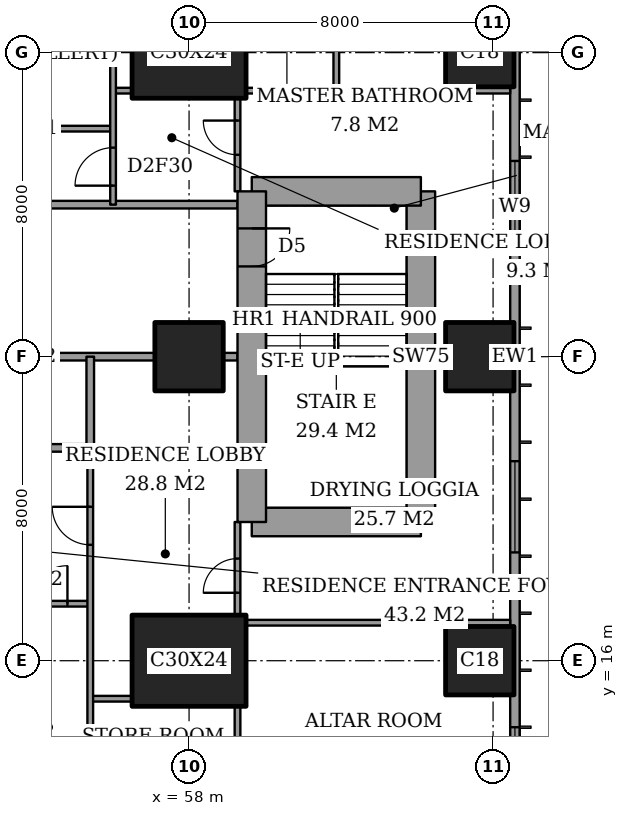
"""IFC4 building model, lengths in metres.
Left out: names, types, materials, properties, quantities, classifications, styles, units other than length and angle.
Written with IfcOpenShell. Run it as: python <this file> out.ifc"""

import sys

from ifc_helpers import new_model, si_unit, direction, frame, frame_2d, origin, origin_2d, place, context, subcontext, project, spatial, rectangle, extrude, element, fill, save


model = new_model("IFC4")
c1 = context("Model", 3, precision=1e-05, world=origin(), true_north=direction((0.0, 1.0)))
c2 = subcontext(c1, "Body", "Model", "MODEL_VIEW")
j1 = project(units=[si_unit("LENGTHUNIT", "METRE"), si_unit("PLANEANGLEUNIT", "RADIAN")], contexts=[c1])
p1 = place(None, origin())
s1 = spatial("IfcSite", under=j1, at=p1, CompositionType="ELEMENT")
p2 = place(p1, origin())
s2 = spatial("IfcBuilding", under=s1, at=p2, CompositionType="ELEMENT")
p3 = place(p2, frame((0.0, 0.0, 211.0)))
s3 = spatial("IfcBuildingStorey", under=s2, at=p3, CompositionType="ELEMENT", Elevation=211.0)
p4 = place(p3, frame((58.0, 16.0, 0.0), z_axis=(0.0, 0.0, 1.0), x_axis=(1.0, 0.0, 0.0)))
e1 = element("IfcColumn", 1, at=p4, inside=s3, PredefinedType="COLUMN", context=c2, shape_type="SweptSolid", body=[
    extrude(rectangle(XDim=3.0, YDim=2.4, at=origin_2d()), origin(), (0.0, 0.0, 1.0), 3.6),
])
p5 = place(p3, frame((58.0, 24.0, 0.0), z_axis=(0.0, 0.0, 1.0), x_axis=(1.0, 0.0, 0.0)))
e2 = element("IfcColumn", 2, at=p5, inside=s3, PredefinedType="COLUMN", context=c2, shape_type="SweptSolid", body=[
    extrude(rectangle(XDim=1.8, YDim=1.8, at=origin_2d()), origin(), (0.0, 0.0, 1.0), 3.6),
])
p6 = place(p3, frame((58.0, 32.0, 0.0), z_axis=(0.0, 0.0, 1.0), x_axis=(1.0, 0.0, 0.0)))
e3 = element("IfcColumn", 3, at=p6, inside=s3, PredefinedType="COLUMN", context=c2, shape_type="SweptSolid", body=[
    extrude(rectangle(XDim=3.0, YDim=2.4, at=origin_2d()), origin(), (0.0, 0.0, 1.0), 3.6),
])
for number, where, z_axis, x_axis in (
    (4, (65.65, 16.0, 0.0), (0.0, 0.0, 1.0), (1.0, 0.0, 0.0)),
    (5, (65.65, 24.0, 0.0), (0.0, 0.0, 1.0), (1.0, 0.0, 0.0)),
    (6, (65.65, 32.0, 0.0), (0.0, 0.0, 1.0), (1.0, 0.0, 0.0)),
):
    element("IfcColumn", number, at=place(p3, frame(where, z_axis=z_axis, x_axis=x_axis)), inside=s3, PredefinedType="COLUMN", context=c2, shape_type="SweptSolid", body=[
        extrude(rectangle(XDim=1.8, YDim=1.8, at=origin_2d()), origin(), (0.0, 0.0, 1.0), 3.6),
    ])
p7 = place(p3, frame((59.65, 19.65, 0.0), z_axis=(0.0, 0.0, 1.0), x_axis=(1.0, 0.0, 0.0)))
e7 = element("IfcWall", 7, at=p7, inside=s3, PredefinedType="SHEAR", context=c2, shape_type="SweptSolid", body=[
    extrude(rectangle(XDim=4.45, YDim=0.75, at=frame_2d((2.225, 0.0))), origin(), (0.0, 0.0, 1.0), 3.6),
])
p8 = place(p3, frame((64.1, 19.65, 0.0), z_axis=(0.0, 0.0, 1.0), x_axis=(0.0, 1.0, 0.0)))
e8 = element("IfcWall", 8, at=p8, inside=s3, PredefinedType="SHEAR", context=c2, shape_type="SweptSolid", body=[
    extrude(rectangle(XDim=8.7, YDim=0.75, at=frame_2d((4.35, 0.0))), origin(), (0.0, 0.0, 1.0), 3.6),
])
p9 = place(p3, frame((64.1, 28.35, 0.0), z_axis=(0.0, 0.0, 1.0), x_axis=(-1.0, 0.0, 0.0)))
e9 = element("IfcWall", 9, at=p9, inside=s3, PredefinedType="SHEAR", context=c2, shape_type="SweptSolid", body=[
    extrude(rectangle(XDim=4.45, YDim=0.75, at=frame_2d((2.225, 0.0))), origin(), (0.0, 0.0, 1.0), 3.6),
])
p10 = place(p3, frame((59.65, 28.35, 0.0), z_axis=(0.0, 0.0, 1.0), x_axis=(0.0, -1.0, 0.0)))
e10 = element("IfcWall", 10, at=p10, inside=s3, PredefinedType="SHEAR", context=c2, shape_type="SweptSolid", body=[
    extrude(rectangle(XDim=8.7, YDim=0.75, at=frame_2d((4.35, 0.0))), origin(), (0.0, 0.0, 1.0), 3.6),
])
p11 = place(p10, frame((0.975, 0.0, 0.0)))
e11 = element("IfcOpeningElement", 11, at=p11, cuts=e10, PredefinedType="OPENING", context=c2, shape_type="SweptSolid", body=[
    extrude(rectangle(XDim=1.0, YDim=2.1, at=frame_2d((0.5, 1.05))), frame((0.0, 0.385, 0.0), z_axis=(0.0, -1.0, 0.0), x_axis=(1.0, 0.0, 0.0)), (0.0, 0.0, 1.0), 0.77),
])
p12 = place(p3, frame((66.575, 3.175, 0.0), z_axis=(0.0, 0.0, 1.0), x_axis=(0.0, 1.0, 0.0)))
e12 = element("IfcWall", 12, at=p12, inside=s3, PredefinedType="SOLIDWALL", context=c2, shape_type="SweptSolid", body=[
    extrude(rectangle(XDim=41.65, YDim=0.25, at=frame_2d((20.825, 0.0))), origin(), (0.0, 0.0, 1.0), 3.6),
])
p13 = place(p12, frame((0.825, 0.0, 0.2)))
e13 = element("IfcOpeningElement", 13, at=p13, cuts=e12, PredefinedType="OPENING", context=c2, shape_type="SweptSolid", body=[
    extrude(rectangle(XDim=2.4, YDim=2.4, at=frame_2d((1.2, 1.2))), frame((0.0, 0.135, 0.0), z_axis=(0.0, -1.0, 0.0), x_axis=(1.0, 0.0, 0.0)), (0.0, 0.0, 1.0), 0.27),
])
p14 = place(p12, frame((6.225, 0.0, 0.2)))
e14 = element("IfcOpeningElement", 14, at=p14, cuts=e12, PredefinedType="OPENING", context=c2, shape_type="SweptSolid", body=[
    extrude(rectangle(XDim=1.2, YDim=2.4, at=frame_2d((0.6, 1.2))), frame((0.0, 0.135, 0.0), z_axis=(0.0, -1.0, 0.0), x_axis=(1.0, 0.0, 0.0)), (0.0, 0.0, 1.0), 0.27),
])
p15 = place(p12, frame((8.675, 0.0, 0.2)))
e15 = element("IfcOpeningElement", 15, at=p15, cuts=e12, PredefinedType="OPENING", context=c2, shape_type="SweptSolid", body=[
    extrude(rectangle(XDim=2.4, YDim=2.4, at=frame_2d((1.2, 1.2))), frame((0.0, 0.135, 0.0), z_axis=(0.0, -1.0, 0.0), x_axis=(1.0, 0.0, 0.0)), (0.0, 0.0, 1.0), 0.27),
])
p16 = place(p12, frame((15.675, 0.0, 0.2)))
e16 = element("IfcOpeningElement", 16, at=p16, cuts=e12, PredefinedType="OPENING", context=c2, shape_type="SweptSolid", body=[
    extrude(rectangle(XDim=2.4, YDim=2.4, at=frame_2d((1.2, 1.2))), frame((0.0, 0.135, 0.0), z_axis=(0.0, -1.0, 0.0), x_axis=(1.0, 0.0, 0.0)), (0.0, 0.0, 1.0), 0.27),
])
p17 = place(p12, frame((23.575, 0.0, 0.2)))
e17 = element("IfcOpeningElement", 17, at=p17, cuts=e12, PredefinedType="OPENING", context=c2, shape_type="SweptSolid", body=[
    extrude(rectangle(XDim=2.4, YDim=2.4, at=frame_2d((1.2, 1.2))), frame((0.0, 0.135, 0.0), z_axis=(0.0, -1.0, 0.0), x_axis=(1.0, 0.0, 0.0)), (0.0, 0.0, 1.0), 0.27),
])
p18 = place(p12, frame((30.775, 0.0, 0.2)))
e18 = element("IfcOpeningElement", 18, at=p18, cuts=e12, PredefinedType="OPENING", context=c2, shape_type="SweptSolid", body=[
    extrude(rectangle(XDim=2.4, YDim=2.4, at=frame_2d((1.2, 1.2))), frame((0.0, 0.135, 0.0), z_axis=(0.0, -1.0, 0.0), x_axis=(1.0, 0.0, 0.0)), (0.0, 0.0, 1.0), 0.27),
])
p19 = place(p12, frame((34.55, 0.0, 0.2)))
e19 = element("IfcOpeningElement", 19, at=p19, cuts=e12, PredefinedType="OPENING", context=c2, shape_type="SweptSolid", body=[
    extrude(rectangle(XDim=1.2, YDim=2.4, at=frame_2d((0.6, 1.2))), frame((0.0, 0.135, 0.0), z_axis=(0.0, -1.0, 0.0), x_axis=(1.0, 0.0, 0.0)), (0.0, 0.0, 1.0), 0.27),
])
p20 = place(p12, frame((38.425, 0.0, 0.2)))
e20 = element("IfcOpeningElement", 20, at=p20, cuts=e12, PredefinedType="OPENING", context=c2, shape_type="SweptSolid", body=[
    extrude(rectangle(XDim=2.4, YDim=2.4, at=frame_2d((1.2, 1.2))), frame((0.0, 0.135, 0.0), z_axis=(0.0, -1.0, 0.0), x_axis=(1.0, 0.0, 0.0)), (0.0, 0.0, 1.0), 0.27),
])
p21 = place(p3, frame((55.4, 15.0, 0.0), z_axis=(0.0, 0.0, 1.0), x_axis=(1.0, 0.0, 0.0)))
e21 = element("IfcWall", 21, at=p21, inside=s3, PredefinedType="PARTITIONING", context=c2, shape_type="SweptSolid", body=[
    extrude(rectangle(XDim=1.1, YDim=0.15, at=frame_2d((0.55, 0.0))), origin(), (0.0, 0.0, 1.0), 3.35),
])
p22 = place(p3, frame((59.5, 17.0, 0.0), z_axis=(0.0, 0.0, 1.0), x_axis=(1.0, 0.0, 0.0)))
e22 = element("IfcWall", 22, at=p22, inside=s3, PredefinedType="PARTITIONING", context=c2, shape_type="SweptSolid", body=[
    extrude(rectangle(XDim=6.95, YDim=0.15, at=frame_2d((3.475, 0.0))), origin(), (0.0, 0.0, 1.0), 3.35),
])
p23 = place(p3, frame((51.6, 17.5, 0.0), z_axis=(0.0, 0.0, 1.0), x_axis=(1.0, 0.0, 0.0)))
e23 = element("IfcWall", 23, at=p23, inside=s3, PredefinedType="PARTITIONING", context=c2, shape_type="SweptSolid", body=[
    extrude(rectangle(XDim=3.8, YDim=0.15, at=frame_2d((1.9, 0.0))), origin(), (0.0, 0.0, 1.0), 3.35),
])
p24 = place(p23, frame((2.2, 0.0, 0.0)))
e24 = element("IfcOpeningElement", 24, at=p24, cuts=e23, PredefinedType="OPENING", context=c2, shape_type="SweptSolid", body=[
    extrude(rectangle(XDim=1.0, YDim=2.1, at=frame_2d((0.5, 1.05))), frame((0.0, 0.085, 0.0), z_axis=(0.0, -1.0, 0.0), x_axis=(1.0, 0.0, 0.0)), (0.0, 0.0, 1.0), 0.17),
])
p25 = place(p3, frame((51.2, 21.6, 0.0), z_axis=(0.0, 0.0, 1.0), x_axis=(1.0, 0.0, 0.0)))
e25 = element("IfcWall", 25, at=p25, inside=s3, PredefinedType="PARTITIONING", context=c2, shape_type="SweptSolid", body=[
    extrude(rectangle(XDim=4.2, YDim=0.2, at=frame_2d((2.1, 0.0))), origin(), (0.0, 0.0, 1.0), 3.35),
])
p26 = place(p25, frame((1.65, 0.0, 0.0)))
e26 = element("IfcOpeningElement", 26, at=p26, cuts=e25, PredefinedType="OPENING", context=c2, shape_type="SweptSolid", body=[
    extrude(rectangle(XDim=0.9, YDim=2.1, at=frame_2d((0.45, 1.05))), frame((0.0, 0.11, 0.0), z_axis=(0.0, -1.0, 0.0), x_axis=(1.0, 0.0, 0.0)), (0.0, 0.0, 1.0), 0.22),
])
p27 = place(p3, frame((50.9, 24.0, 0.0), z_axis=(0.0, 0.0, 1.0), x_axis=(1.0, 0.0, 0.0)))
e27 = element("IfcWall", 27, at=p27, inside=s3, PredefinedType="PARTITIONING", context=c2, shape_type="SweptSolid", body=[
    extrude(rectangle(XDim=6.2, YDim=0.2, at=frame_2d((3.1, 0.0))), origin(), (0.0, 0.0, 1.0), 3.35),
])
p28 = place(p3, frame((58.9, 24.0, 0.0), z_axis=(0.0, 0.0, 1.0), x_axis=(1.0, 0.0, 0.0)))
e28 = element("IfcWall", 28, at=p28, inside=s3, PredefinedType="PARTITIONING", context=c2, shape_type="SweptSolid", body=[
    extrude(rectangle(XDim=0.375, YDim=0.2, at=frame_2d((0.188, 0.0))), origin(), (0.0, 0.0, 1.0), 3.35),
])
p29 = place(p3, frame((42.0, 28.0, 0.0), z_axis=(0.0, 0.0, 1.0), x_axis=(1.0, 0.0, 0.0)))
e29 = element("IfcWall", 29, at=p29, inside=s3, PredefinedType="PARTITIONING", context=c2, shape_type="SweptSolid", body=[
    extrude(rectangle(XDim=17.275, YDim=0.2, at=frame_2d((8.637, 0.0))), origin(), (0.0, 0.0, 1.0), 3.35),
])
p30 = place(p29, frame((9.4, 0.0, 0.0)))
e30 = element("IfcOpeningElement", 30, at=p30, cuts=e29, PredefinedType="OPENING", context=c2, shape_type="SweptSolid", body=[
    extrude(rectangle(XDim=1.2, YDim=2.4, at=frame_2d((0.6, 1.2))), frame((0.0, 0.11, 0.0), z_axis=(0.0, -1.0, 0.0), x_axis=(1.0, 0.0, 0.0)), (0.0, 0.0, 1.0), 0.22),
])
p31 = place(p3, frame((51.6, 30.0, 0.0), z_axis=(0.0, 0.0, 1.0), x_axis=(1.0, 0.0, 0.0)))
e31 = element("IfcWall", 31, at=p31, inside=s3, PredefinedType="PARTITIONING", context=c2, shape_type="SweptSolid", body=[
    extrude(rectangle(XDim=4.4, YDim=0.15, at=frame_2d((2.2, 0.0))), origin(), (0.0, 0.0, 1.0), 3.35),
])
p32 = place(p31, frame((0.6, 0.0, 0.0)))
e32 = element("IfcOpeningElement", 32, at=p32, cuts=e31, PredefinedType="OPENING", context=c2, shape_type="SweptSolid", body=[
    extrude(rectangle(XDim=1.0, YDim=2.1, at=frame_2d((0.5, 1.05))), frame((0.0, 0.085, 0.0), z_axis=(0.0, -1.0, 0.0), x_axis=(1.0, 0.0, 0.0)), (0.0, 0.0, 1.0), 0.17),
])
p33 = place(p3, frame((56.0, 31.0, 0.0), z_axis=(0.0, 0.0, 1.0), x_axis=(1.0, 0.0, 0.0)))
e33 = element("IfcWall", 33, at=p33, inside=s3, PredefinedType="PARTITIONING", context=c2, shape_type="SweptSolid", body=[
    extrude(rectangle(XDim=0.5, YDim=0.15, at=frame_2d((0.25, 0.0))), origin(), (0.0, 0.0, 1.0), 3.35),
])
p34 = place(p3, frame((59.5, 31.0, 0.0), z_axis=(0.0, 0.0, 1.0), x_axis=(1.0, 0.0, 0.0)))
e34 = element("IfcWall", 34, at=p34, inside=s3, PredefinedType="PARTITIONING", context=c2, shape_type="SweptSolid", body=[
    extrude(rectangle(XDim=6.95, YDim=0.15, at=frame_2d((3.475, 0.0))), origin(), (0.0, 0.0, 1.0), 3.35),
])
p35 = place(p3, frame((55.4, 21.6, 0.0), z_axis=(0.0, 0.0, 1.0), x_axis=(0.0, 1.0, 0.0)))
e35 = element("IfcWall", 35, at=p35, inside=s3, PredefinedType="PARTITIONING", context=c2, shape_type="SweptSolid", body=[
    extrude(rectangle(XDim=2.4, YDim=0.2, at=frame_2d((1.2, 0.0))), origin(), (0.0, 0.0, 1.0), 3.35),
])
p36 = place(p3, frame((55.4, 11.0, 0.0), z_axis=(0.0, 0.0, 1.0), x_axis=(0.0, 1.0, 0.0)))
e36 = element("IfcWall", 36, at=p36, inside=s3, PredefinedType="PARTITIONING", context=c2, shape_type="SweptSolid", body=[
    extrude(rectangle(XDim=10.6, YDim=0.15, at=frame_2d((5.3, 0.0))), origin(), (0.0, 0.0, 1.0), 3.35),
])
p37 = place(p36, frame((8.05, 0.0, 0.0)))
e37 = element("IfcOpeningElement", 37, at=p37, cuts=e36, PredefinedType="OPENING", context=c2, shape_type="SweptSolid", body=[
    extrude(rectangle(XDim=1.0, YDim=2.1, at=frame_2d((0.5, 1.05))), frame((0.0, 0.085, 0.0), z_axis=(0.0, -1.0, 0.0), x_axis=(1.0, 0.0, 0.0)), (0.0, 0.0, 1.0), 0.17),
])
p38 = place(p3, frame((56.0, 28.0, 0.0), z_axis=(0.0, 0.0, 1.0), x_axis=(0.0, 1.0, 0.0)))
e38 = element("IfcWall", 38, at=p38, inside=s3, PredefinedType="PARTITIONING", context=c2, shape_type="SweptSolid", body=[
    extrude(rectangle(XDim=9.4, YDim=0.15, at=frame_2d((4.7, 0.0))), origin(), (0.0, 0.0, 1.0), 3.35),
])
p39 = place(p38, frame((0.5, 0.0, 0.0)))
e39 = element("IfcOpeningElement", 39, at=p39, cuts=e38, PredefinedType="OPENING", context=c2, shape_type="SweptSolid", body=[
    extrude(rectangle(XDim=1.0, YDim=2.1, at=frame_2d((0.5, 1.05))), frame((0.0, 0.085, 0.0), z_axis=(0.0, -1.0, 0.0), x_axis=(1.0, 0.0, 0.0)), (0.0, 0.0, 1.0), 0.17),
])
p40 = place(p3, frame((59.275, 11.0, 0.0), z_axis=(0.0, 0.0, 1.0), x_axis=(0.0, 1.0, 0.0)))
e40 = element("IfcWall", 40, at=p40, inside=s3, PredefinedType="PARTITIONING", context=c2, shape_type="SweptSolid", body=[
    extrude(rectangle(XDim=3.8, YDim=0.15, at=frame_2d((1.9, 0.0))), origin(), (0.0, 0.0, 1.0), 3.35),
])
p41 = place(p3, frame((59.275, 17.2, 0.0), z_axis=(0.0, 0.0, 1.0), x_axis=(0.0, 1.0, 0.0)))
e41 = element("IfcWall", 41, at=p41, inside=s3, PredefinedType="PARTITIONING", context=c2, shape_type="SweptSolid", body=[
    extrude(rectangle(XDim=2.45, YDim=0.15, at=frame_2d((1.225, 0.0))), origin(), (0.0, 0.0, 1.0), 3.35),
])
p42 = place(p41, frame((0.587, 0.0, 0.0)))
e42 = element("IfcOpeningElement", 42, at=p42, cuts=e41, PredefinedType="OPENING", context=c2, shape_type="SweptSolid", body=[
    extrude(rectangle(XDim=0.9, YDim=2.1, at=frame_2d((0.45, 1.05))), frame((0.0, 0.085, 0.0), z_axis=(0.0, -1.0, 0.0), x_axis=(1.0, 0.0, 0.0)), (0.0, 0.0, 1.0), 0.17),
])
p43 = place(p3, frame((59.275, 28.35, 0.0), z_axis=(0.0, 0.0, 1.0), x_axis=(0.0, 1.0, 0.0)))
e43 = element("IfcWall", 43, at=p43, inside=s3, PredefinedType="PARTITIONING", context=c2, shape_type="SweptSolid", body=[
    extrude(rectangle(XDim=2.45, YDim=0.15, at=frame_2d((1.225, 0.0))), origin(), (0.0, 0.0, 1.0), 3.35),
])
p44 = place(p43, frame((0.962, 0.0, 0.0)))
e44 = element("IfcOpeningElement", 44, at=p44, cuts=e43, PredefinedType="OPENING", context=c2, shape_type="SweptSolid", body=[
    extrude(rectangle(XDim=0.9, YDim=2.1, at=frame_2d((0.45, 1.05))), frame((0.0, 0.085, 0.0), z_axis=(0.0, -1.0, 0.0), x_axis=(1.0, 0.0, 0.0)), (0.0, 0.0, 1.0), 0.17),
])
p45 = place(p3, frame((61.875, 31.0, 0.0), z_axis=(0.0, 0.0, 1.0), x_axis=(0.0, 1.0, 0.0)))
e45 = element("IfcWall", 45, at=p45, inside=s3, PredefinedType="PARTITIONING", context=c2, shape_type="SweptSolid", body=[
    extrude(rectangle(XDim=3.0, YDim=0.15, at=frame_2d((1.5, 0.0))), origin(), (0.0, 0.0, 1.0), 3.35),
])
p46 = place(p45, frame((1.05, 0.0, 0.0)))
e46 = element("IfcOpeningElement", 46, at=p46, cuts=e45, PredefinedType="OPENING", context=c2, shape_type="SweptSolid", body=[
    extrude(rectangle(XDim=0.9, YDim=2.1, at=frame_2d((0.45, 1.05))), frame((0.0, 0.085, 0.0), z_axis=(0.0, -1.0, 0.0), x_axis=(1.0, 0.0, 0.0)), (0.0, 0.0, 1.0), 0.17),
])
p47 = place(p15, origin())
e47 = element("IfcWindow", 47, at=p47, inside=s3, PartitioningType="SINGLE_PANEL", PredefinedType="WINDOW", context=c2, shape_type="SweptSolid", body=[
    extrude(rectangle(XDim=2.4, YDim=2.4, at=frame_2d((1.2, 1.2))), frame((0.0, 0.03, 0.0), z_axis=(0.0, -1.0, 0.0), x_axis=(1.0, 0.0, 0.0)), (0.0, 0.0, 1.0), 0.06),
])
fill(e15, e47)
p48 = place(p16, origin())
e48 = element("IfcWindow", 48, at=p48, inside=s3, PartitioningType="SINGLE_PANEL", PredefinedType="WINDOW", context=c2, shape_type="SweptSolid", body=[
    extrude(rectangle(XDim=2.4, YDim=2.4, at=frame_2d((1.2, 1.2))), frame((0.0, 0.03, 0.0), z_axis=(0.0, -1.0, 0.0), x_axis=(1.0, 0.0, 0.0)), (0.0, 0.0, 1.0), 0.06),
])
fill(e16, e48)
p49 = place(p17, origin())
e49 = element("IfcWindow", 49, at=p49, inside=s3, PartitioningType="SINGLE_PANEL", PredefinedType="WINDOW", context=c2, shape_type="SweptSolid", body=[
    extrude(rectangle(XDim=2.4, YDim=2.4, at=frame_2d((1.2, 1.2))), frame((0.0, 0.03, 0.0), z_axis=(0.0, -1.0, 0.0), x_axis=(1.0, 0.0, 0.0)), (0.0, 0.0, 1.0), 0.06),
])
fill(e17, e49)
p50 = place(p42, origin())
e50 = element("IfcDoor", 50, at=p50, inside=s3, OperationType="SINGLE_SWING_RIGHT", PredefinedType="DOOR", context=c2, shape_type="SweptSolid", body=[
    extrude(rectangle(XDim=0.9, YDim=2.1, at=frame_2d((0.45, 1.05))), frame((0.0, 0.025, 0.0), z_axis=(0.0, -1.0, 0.0), x_axis=(1.0, 0.0, 0.0)), (0.0, 0.0, 1.0), 0.05),
])
fill(e42, e50)
p51 = place(p37, origin())
e51 = element("IfcDoor", 51, at=p51, inside=s3, OperationType="SINGLE_SWING_LEFT", PredefinedType="DOOR", context=c2, shape_type="SweptSolid", body=[
    extrude(rectangle(XDim=1.0, YDim=2.1, at=frame_2d((0.5, 1.05))), frame((0.0, 0.025, 0.0), z_axis=(0.0, -1.0, 0.0), x_axis=(1.0, 0.0, 0.0)), (0.0, 0.0, 1.0), 0.05),
])
fill(e37, e51)
p52 = place(p24, origin())
e52 = element("IfcDoor", 52, at=p52, inside=s3, OperationType="SINGLE_SWING_LEFT", PredefinedType="DOOR", context=c2, shape_type="SweptSolid", body=[
    extrude(rectangle(XDim=1.0, YDim=2.1, at=frame_2d((0.5, 1.05))), frame((0.0, 0.025, 0.0), z_axis=(0.0, -1.0, 0.0), x_axis=(1.0, 0.0, 0.0)), (0.0, 0.0, 1.0), 0.05),
])
fill(e24, e52)
p53 = place(p44, origin())
e53 = element("IfcDoor", 53, at=p53, inside=s3, OperationType="SINGLE_SWING_LEFT", PredefinedType="DOOR", context=c2, shape_type="SweptSolid", body=[
    extrude(rectangle(XDim=0.9, YDim=2.1, at=frame_2d((0.45, 1.05))), frame((0.0, 0.025, 0.0), z_axis=(0.0, -1.0, 0.0), x_axis=(1.0, 0.0, 0.0)), (0.0, 0.0, 1.0), 0.05),
])
fill(e44, e53)
p54 = place(p39, origin())
e54 = element("IfcDoor", 54, at=p54, inside=s3, OperationType="SINGLE_SWING_RIGHT", PredefinedType="DOOR", context=c2, shape_type="SweptSolid", body=[
    extrude(rectangle(XDim=1.0, YDim=2.1, at=frame_2d((0.5, 1.05))), frame((0.0, 0.025, 0.0), z_axis=(0.0, -1.0, 0.0), x_axis=(1.0, 0.0, 0.0)), (0.0, 0.0, 1.0), 0.05),
])
fill(e39, e54)
p55 = place(p11, origin())
e55 = element("IfcDoor", 55, at=p55, inside=s3, OperationType="SINGLE_SWING_RIGHT", PredefinedType="DOOR", context=c2, shape_type="SweptSolid", body=[
    extrude(rectangle(XDim=1.0, YDim=2.1, at=frame_2d((0.5, 1.05))), frame((0.0, 0.025, 0.0), z_axis=(0.0, -1.0, 0.0), x_axis=(1.0, 0.0, 0.0)), (0.0, 0.0, 1.0), 0.05),
])
fill(e11, e55)
save(model, sys.argv[1])
